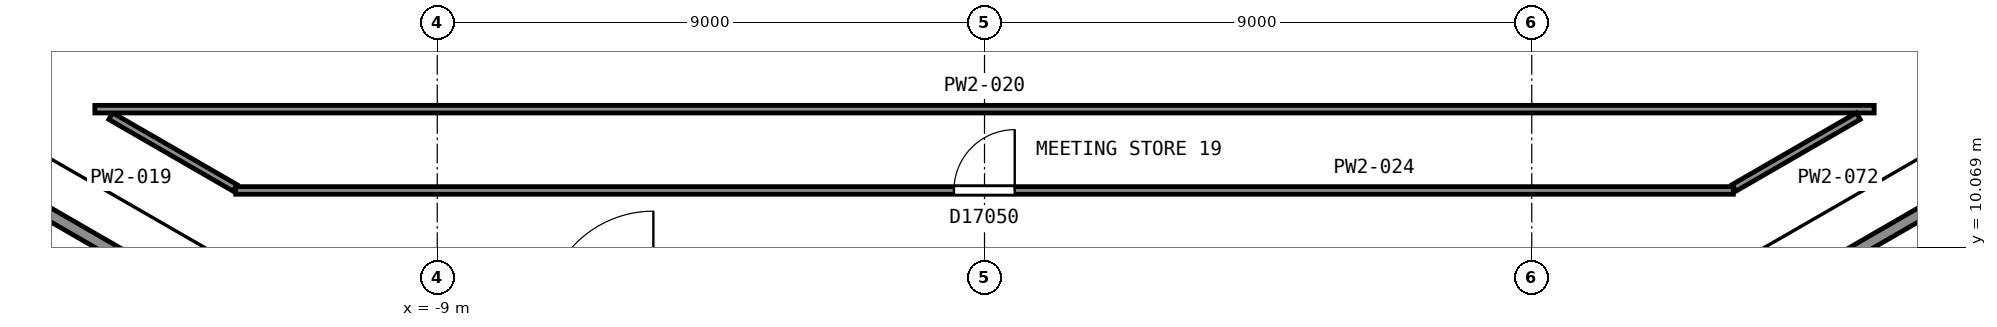
"""IFC4 building model, lengths in metres.
Left out: names, types, materials, properties, quantities, classifications, styles, units other than length and angle.
Written with IfcOpenShell. Run it as: python <this file> out.ifc"""

import sys

from ifc_helpers import new_model, si_unit, direction, frame, frame_2d, origin, place, context, subcontext, project, spatial, rectangle, extrude, element, fill, save


model = new_model("IFC4")
c1 = context("Model", 3, precision=1e-05, world=origin(), true_north=direction((0.0, 1.0)))
c2 = subcontext(c1, "Body", "Model", "MODEL_VIEW")
j1 = project(units=[si_unit("LENGTHUNIT", "METRE"), si_unit("PLANEANGLEUNIT", "RADIAN")], contexts=[c1])
p1 = place(None, origin())
s1 = spatial("IfcSite", under=j1, at=p1, CompositionType="ELEMENT")
p2 = place(p1, origin())
s2 = spatial("IfcBuilding", under=s1, at=p2, CompositionType="ELEMENT")
p3 = place(p2, frame((0.0, 0.0, 83.6)))
s3 = spatial("IfcBuildingStorey", under=s2, at=p3, CompositionType="ELEMENT", Elevation=83.6)
for number, where, z_axis, x_axis in (
    (1, (6.178, 5.299, 0.0), (0.0, 0.0, 1.0), (0.866, 0.5, 0.0)),
    (2, (-6.178, 5.299, 0.0), (0.0, 0.0, 1.0), (-0.866, 0.5, 0.0)),
):
    element("IfcWall", number, at=place(p3, frame(where, z_axis=z_axis, x_axis=x_axis)), inside=s3, PredefinedType="PARTITIONING", context=c2, shape_type="SweptSolid", body=[
        extrude(rectangle(XDim=12.0, YDim=0.2, at=frame_2d((6.0, 0.0))), origin(), (0.0, 0.0, 1.0), 3.35),
    ])
p4 = place(p3, frame((-14.37, 12.222, 0.0), z_axis=(0.0, 0.0, 1.0), x_axis=(0.866063239147, -0.499934461503, 0.0)))
e3 = element("IfcWall", 3, at=p4, inside=s3, PredefinedType="PARTITIONING", context=c2, shape_type="SweptSolid", body=[
    extrude(rectangle(XDim=2.359, YDim=0.125, at=frame_2d((1.18, 0.0))), origin(), (0.0, 0.0, 1.0), 2.262),
])
p5 = place(p3, frame((-14.632, 12.337, 0.0), z_axis=(0.0, 0.0, 1.0), x_axis=(1.0, 0.0, 0.0)))
e4 = element("IfcWall", 4, at=p5, inside=s3, PredefinedType="PARTITIONING", context=c2, shape_type="SweptSolid", body=[
    extrude(rectangle(XDim=29.263, YDim=0.125, at=frame_2d((14.632, 0.0))), origin(), (0.0, 0.0, 1.0), 2.262),
])
p6 = place(p3, frame((-12.315, 11.0, 0.0), z_axis=(0.0, 0.0, 1.0), x_axis=(1.0, 0.0, 0.0)))
e5 = element("IfcWall", 5, at=p6, inside=s3, PredefinedType="PARTITIONING", context=c2, shape_type="SweptSolid", body=[
    extrude(rectangle(XDim=24.631, YDim=0.125, at=frame_2d((12.315, 0.0))), origin(), (0.0, 0.0, 1.0), 2.262),
])
p7 = place(p6, frame((11.812, 0.0, 0.0)))
e6 = element("IfcOpeningElement", 6, at=p7, cuts=e5, PredefinedType="OPENING", context=c2, shape_type="SweptSolid", body=[
    extrude(rectangle(XDim=1.0, YDim=2.1, at=frame_2d((0.5, 1.05))), frame((0.0, 0.073, 0.0), z_axis=(0.0, -1.0, 0.0), x_axis=(1.0, 0.0, 0.0)), (0.0, 0.0, 1.0), 0.145),
])
p8 = place(p3, frame((12.327, 11.042, 0.0), z_axis=(0.0, 0.0, 1.0), x_axis=(0.866063239147, 0.499934461503, 0.0)))
e7 = element("IfcWall", 7, at=p8, inside=s3, PredefinedType="PARTITIONING", context=c2, shape_type="SweptSolid", body=[
    extrude(rectangle(XDim=2.359, YDim=0.125, at=frame_2d((1.18, 0.0))), origin(), (0.0, 0.0, 1.0), 2.262),
])
p9 = place(p7, origin())
e8 = element("IfcDoor", 8, at=p9, inside=s3, OperationType="SINGLE_SWING_RIGHT", PredefinedType="DOOR", context=c2, shape_type="SweptSolid", body=[
    extrude(rectangle(XDim=1.0, YDim=2.1, at=frame_2d((0.5, 1.05))), frame((0.0, 0.025, 0.0), z_axis=(0.0, -1.0, 0.0), x_axis=(1.0, 0.0, 0.0)), (0.0, 0.0, 1.0), 0.05),
])
fill(e6, e8)
save(model, sys.argv[1])
